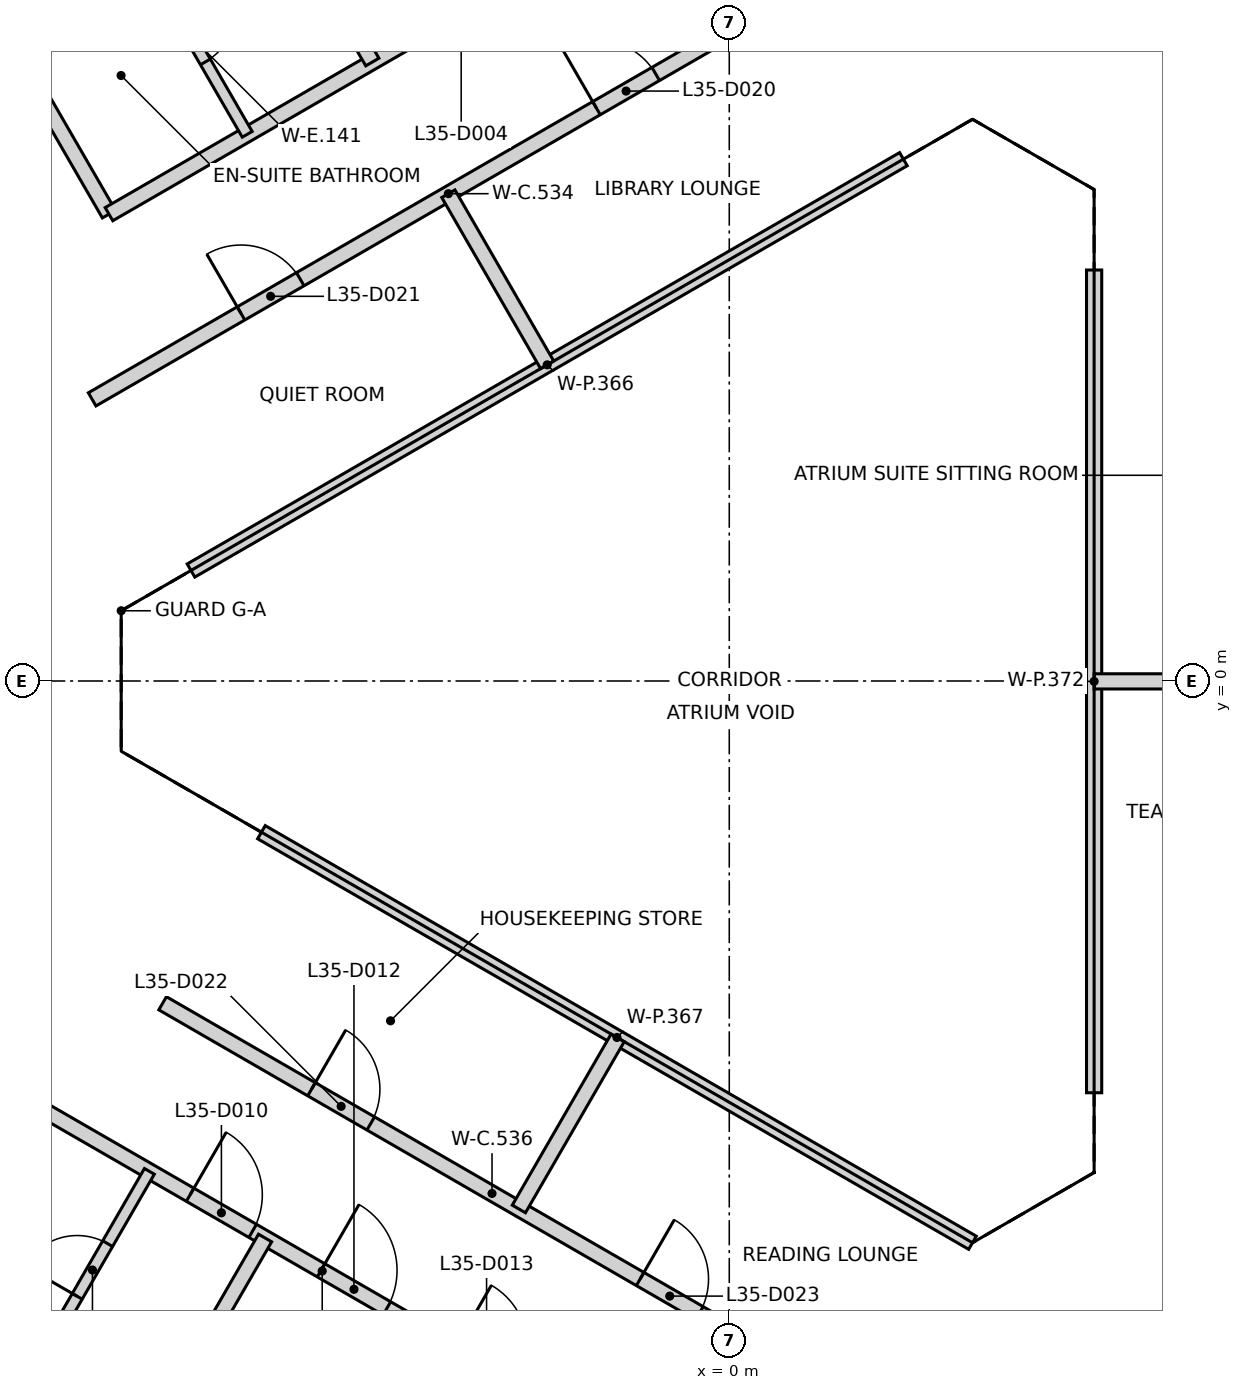
"""IFC4 building model, lengths in metres.
Left out: names, types, materials, properties, quantities, classifications, styles, units other than length and angle.
Written with IfcOpenShell. Run it as: python <this file> out.ifc"""

import sys

from ifc_helpers import new_model, si_unit, direction, frame, frame_2d, origin, place, context, subcontext, project, spatial, rectangle, extrude, element, fill, save


model = new_model("IFC4")
c1 = context("Model", 3, precision=1e-05, world=origin(), true_north=direction((0.0, 1.0)))
c2 = subcontext(c1, "Body", "Model", "MODEL_VIEW")
j1 = project(units=[si_unit("LENGTHUNIT", "METRE"), si_unit("PLANEANGLEUNIT", "RADIAN")], contexts=[c1])
p1 = place(None, origin())
s1 = spatial("IfcSite", under=j1, at=p1, CompositionType="ELEMENT")
p2 = place(p1, origin())
s2 = spatial("IfcBuilding", under=s1, at=p2, CompositionType="ELEMENT")
p3 = place(p2, frame((0.0, 0.0, 143.2)))
s3 = spatial("IfcBuildingStorey", under=s2, at=p3, CompositionType="ELEMENT", Elevation=143.2)
p4 = place(p3, frame((10.42, 6.498, 0.0), z_axis=(0.0, 0.0, 1.0), x_axis=(-0.866021906294, 0.500006057782, 0.0)))
e1 = element("IfcWall", 1, at=p4, inside=s3, PredefinedType="SHEAR", context=c2, shape_type="SweptSolid", body=[
    extrude(rectangle(XDim=11.55, YDim=0.25, at=frame_2d((5.775, 0.0))), origin(), (0.0, 0.0, 1.0), 3.2),
])
p5 = place(p4, frame((10.025, 0.0, 0.0)))
e2 = element("IfcOpeningElement", 2, at=p5, cuts=e1, PredefinedType="OPENING", context=c2, shape_type="SweptSolid", body=[
    extrude(rectangle(XDim=1.2, YDim=2.1, at=frame_2d((0.6, 1.05))), frame((0.0, 0.135, 0.0), z_axis=(0.0, -1.0, 0.0), x_axis=(1.0, 0.0, 0.0)), (0.0, 0.0, 1.0), 0.27),
])
p6 = place(p4, frame((8.725, 0.0, 0.0)))
e3 = element("IfcOpeningElement", 3, at=p6, cuts=e1, PredefinedType="OPENING", context=c2, shape_type="SweptSolid", body=[
    extrude(rectangle(XDim=1.2, YDim=2.1, at=frame_2d((0.6, 1.05))), frame((0.0, 0.135, 0.0), z_axis=(0.0, -1.0, 0.0), x_axis=(1.0, 0.0, 0.0)), (0.0, 0.0, 1.0), 0.27),
])
p7 = place(p3, frame((0.417, -12.273, 0.0), z_axis=(0.0, 0.0, 1.0), x_axis=(0.866021906294, 0.500006057782, 0.0)))
e4 = element("IfcWall", 4, at=p7, inside=s3, PredefinedType="SHEAR", context=c2, shape_type="SweptSolid", body=[
    extrude(rectangle(XDim=11.55, YDim=0.25, at=frame_2d((5.775, 0.0))), origin(), (0.0, 0.0, 1.0), 3.2),
])
p8 = place(p7, frame((10.025, 0.0, 0.0)))
e5 = element("IfcOpeningElement", 5, at=p8, cuts=e4, PredefinedType="OPENING", context=c2, shape_type="SweptSolid", body=[
    extrude(rectangle(XDim=1.2, YDim=2.1, at=frame_2d((0.6, 1.05))), frame((0.0, 0.135, 0.0), z_axis=(0.0, -1.0, 0.0), x_axis=(1.0, 0.0, 0.0)), (0.0, 0.0, 1.0), 0.27),
])
p9 = place(p7, frame((8.725, 0.0, 0.0)))
e6 = element("IfcOpeningElement", 6, at=p9, cuts=e4, PredefinedType="OPENING", context=c2, shape_type="SweptSolid", body=[
    extrude(rectangle(XDim=1.2, YDim=2.1, at=frame_2d((0.6, 1.05))), frame((0.0, 0.135, 0.0), z_axis=(0.0, -1.0, 0.0), x_axis=(1.0, 0.0, 0.0)), (0.0, 0.0, 1.0), 0.27),
])
p10 = place(p3, frame((-9.447, -5.4, 0.0), z_axis=(0.0, 0.0, 1.0), x_axis=(0.866101262146, -0.49986858644, 0.0)))
e7 = element("IfcWall", 7, at=p10, inside=s3, PredefinedType="PARTITIONING", context=c2, shape_type="SweptSolid", body=[
    extrude(rectangle(XDim=9.449, YDim=0.2, at=frame_2d((4.724, 0.0))), origin(), (0.0, 0.0, 1.0), 3.2),
])
p11 = place(p10, frame((2.718, 0.0, 0.0)))
e8 = element("IfcOpeningElement", 8, at=p11, cuts=e7, PredefinedType="OPENING", context=c2, shape_type="SweptSolid", body=[
    extrude(rectangle(XDim=0.95, YDim=2.1, at=frame_2d((0.475, 1.05))), frame((0.0, 0.11, 0.0), z_axis=(0.0, -1.0, 0.0), x_axis=(1.0, 0.0, 0.0)), (0.0, 0.0, 1.0), 0.22),
])
p12 = place(p10, frame((4.707, 0.0, 0.0)))
e9 = element("IfcOpeningElement", 9, at=p12, cuts=e7, PredefinedType="OPENING", context=c2, shape_type="SweptSolid", body=[
    extrude(rectangle(XDim=1.0, YDim=2.1, at=frame_2d((0.5, 1.05))), frame((0.0, 0.11, 0.0), z_axis=(0.0, -1.0, 0.0), x_axis=(1.0, 0.0, 0.0)), (0.0, 0.0, 1.0), 0.22),
])
p13 = place(p10, frame((6.746, 0.0, 0.0)))
e10 = element("IfcOpeningElement", 10, at=p13, cuts=e7, PredefinedType="OPENING", context=c2, shape_type="SweptSolid", body=[
    extrude(rectangle(XDim=0.95, YDim=2.1, at=frame_2d((0.475, 1.05))), frame((0.0, 0.11, 0.0), z_axis=(0.0, -1.0, 0.0), x_axis=(1.0, 0.0, 0.0)), (0.0, 0.0, 1.0), 0.22),
])
p14 = place(p3, frame((-9.033, 7.651, 0.0), z_axis=(0.0, 0.0, 1.0), x_axis=(0.500417633986, -0.865784148386, 0.0)))
e11 = element("IfcWall", 11, at=p14, inside=s3, PredefinedType="PARTITIONING", context=c2, shape_type="SweptSolid", body=[
    extrude(rectangle(XDim=1.743, YDim=0.2, at=frame_2d((0.871, 0.0))), origin(), (0.0, 0.0, 1.0), 3.2),
])
p15 = place(p3, frame((-8.382, 3.705, 0.0), z_axis=(0.0, 0.0, 1.0), x_axis=(0.866012036978, 0.500023151273, 0.0)))
e12 = element("IfcWall", 12, at=p15, inside=s3, PredefinedType="PARTITIONING", context=c2, shape_type="SweptSolid", body=[
    extrude(rectangle(XDim=10.823, YDim=0.2, at=frame_2d((5.412, 0.0))), origin(), (0.0, 0.0, 1.0), 3.2),
])
p16 = place(p15, frame((7.661, 0.0, 0.0)))
e13 = element("IfcOpeningElement", 13, at=p16, cuts=e12, PredefinedType="OPENING", context=c2, shape_type="SweptSolid", body=[
    extrude(rectangle(XDim=0.9, YDim=2.1, at=frame_2d((0.45, 1.05))), frame((0.0, 0.11, 0.0), z_axis=(0.0, -1.0, 0.0), x_axis=(1.0, 0.0, 0.0)), (0.0, 0.0, 1.0), 0.22),
])
p17 = place(p15, frame((2.261, 0.0, 0.0)))
e14 = element("IfcOpeningElement", 14, at=p17, cuts=e12, PredefinedType="OPENING", context=c2, shape_type="SweptSolid", body=[
    extrude(rectangle(XDim=0.9, YDim=2.1, at=frame_2d((0.45, 1.05))), frame((0.0, 0.11, 0.0), z_axis=(0.0, -1.0, 0.0), x_axis=(1.0, 0.0, 0.0)), (0.0, 0.0, 1.0), 0.22),
])
p18 = place(p3, frame((-8.161, 6.142, 0.0), z_axis=(0.0, 0.0, 1.0), x_axis=(0.865927304867, 0.500169873828, 0.0)))
e15 = element("IfcWall", 15, at=p18, inside=s3, PredefinedType="PARTITIONING", context=c2, shape_type="SweptSolid", body=[
    extrude(rectangle(XDim=9.478, YDim=0.2, at=frame_2d((4.739, 0.0))), origin(), (0.0, 0.0, 1.0), 3.2),
])
p19 = place(p18, frame((4.851, 0.0, 0.0)))
e16 = element("IfcOpeningElement", 16, at=p19, cuts=e15, PredefinedType="OPENING", context=c2, shape_type="SweptSolid", body=[
    extrude(rectangle(XDim=1.0, YDim=2.1, at=frame_2d((0.5, 1.05))), frame((0.0, 0.11, 0.0), z_axis=(0.0, -1.0, 0.0), x_axis=(1.0, 0.0, 0.0)), (0.0, 0.0, 1.0), 0.22),
])
p20 = place(p18, frame((7.583, 0.0, 0.0)))
e17 = element("IfcOpeningElement", 17, at=p20, cuts=e15, PredefinedType="OPENING", context=c2, shape_type="SweptSolid", body=[
    extrude(rectangle(XDim=1.0, YDim=2.1, at=frame_2d((0.5, 1.05))), frame((0.0, 0.11, 0.0), z_axis=(0.0, -1.0, 0.0), x_axis=(1.0, 0.0, 0.0)), (0.0, 0.0, 1.0), 0.22),
])
p21 = place(p3, frame((-7.455, -4.24, 0.0), z_axis=(0.0, 0.0, 1.0), x_axis=(0.866015783746, -0.500016662025, 0.0)))
e18 = element("IfcWall", 18, at=p21, inside=s3, PredefinedType="PARTITIONING", context=c2, shape_type="SweptSolid", body=[
    extrude(rectangle(XDim=10.009, YDim=0.2, at=frame_2d((5.004, 0.0))), origin(), (0.0, 0.0, 1.0), 3.2),
])
p22 = place(p21, frame((2.262, 0.0, 0.0)))
e19 = element("IfcOpeningElement", 19, at=p22, cuts=e18, PredefinedType="OPENING", context=c2, shape_type="SweptSolid", body=[
    extrude(rectangle(XDim=0.9, YDim=2.1, at=frame_2d((0.45, 1.05))), frame((0.0, 0.11, 0.0), z_axis=(0.0, -1.0, 0.0), x_axis=(1.0, 0.0, 0.0)), (0.0, 0.0, 1.0), 0.22),
])
p23 = place(p21, frame((7.254, 0.0, 0.0)))
e20 = element("IfcOpeningElement", 20, at=p23, cuts=e18, PredefinedType="OPENING", context=c2, shape_type="SweptSolid", body=[
    extrude(rectangle(XDim=0.9, YDim=2.1, at=frame_2d((0.45, 1.05))), frame((0.0, 0.11, 0.0), z_axis=(0.0, -1.0, 0.0), x_axis=(1.0, 0.0, 0.0)), (0.0, 0.0, 1.0), 0.22),
])
p24 = place(p3, frame((-12.22, -17.917, 0.0), z_axis=(0.0, 0.0, 1.0), x_axis=(0.499963860175, 0.866046268117, 0.0)))
e21 = element("IfcWall", 21, at=p24, inside=s3, PredefinedType="PARTITIONING", context=c2, shape_type="SweptSolid", body=[
    extrude(rectangle(XDim=12.227, YDim=0.2, at=frame_2d((6.114, 0.0))), origin(), (0.0, 0.0, 1.0), 2.3),
])
p25 = place(p3, frame((-10.809, 18.731, 0.0), z_axis=(0.0, 0.0, 1.0), x_axis=(0.500004774777, -0.866022647048, 0.0)))
e22 = element("IfcWall", 22, at=p25, inside=s3, PredefinedType="PARTITIONING", context=c2, shape_type="SweptSolid", body=[
    extrude(rectangle(XDim=12.227, YDim=0.2, at=frame_2d((6.113, 0.0))), origin(), (0.0, 0.0, 1.0), 2.3),
])
p26 = place(p3, frame((-7.082, 1.453, 0.0), z_axis=(0.0, 0.0, 1.0), x_axis=(0.866010525116, 0.500025769724, 0.0)))
e23 = element("IfcWall", 23, at=p26, inside=s3, PredefinedType="PARTITIONING", context=c2, shape_type="SweptSolid", body=[
    extrude(rectangle(XDim=10.823, YDim=0.2, at=frame_2d((5.411, 0.0))), origin(), (0.0, 0.0, 1.0), 2.3),
])
p27 = place(p3, frame((-6.155, -1.989, 0.0), z_axis=(0.0, 0.0, 1.0), x_axis=(0.866009062299, -0.500028303215, 0.0)))
e24 = element("IfcWall", 24, at=p27, inside=s3, PredefinedType="PARTITIONING", context=c2, shape_type="SweptSolid", body=[
    extrude(rectangle(XDim=10.802, YDim=0.2, at=frame_2d((5.401, 0.0))), origin(), (0.0, 0.0, 1.0), 2.3),
])
p28 = place(p3, frame((-3.696, 6.411, 0.0), z_axis=(0.0, 0.0, 1.0), x_axis=(0.500006934395, -0.866021400173, 0.0)))
e25 = element("IfcWall", 25, at=p28, inside=s3, PredefinedType="PARTITIONING", context=c2, shape_type="SweptSolid", body=[
    extrude(rectangle(XDim=2.6, YDim=0.2, at=frame_2d((1.3, 0.0))), origin(), (0.0, 0.0, 1.0), 2.3),
])
p29 = place(p3, frame((-2.768, -6.946, 0.0), z_axis=(0.0, 0.0, 1.0), x_axis=(0.500017832597, 0.866015107885, 0.0)))
e26 = element("IfcWall", 26, at=p29, inside=s3, PredefinedType="PARTITIONING", context=c2, shape_type="SweptSolid", body=[
    extrude(rectangle(XDim=2.6, YDim=0.2, at=frame_2d((1.3, 0.0))), origin(), (0.0, 0.0, 1.0), 2.3),
])
p30 = place(p3, frame((4.8, -5.417, 0.0), z_axis=(0.0, 0.0, 1.0), x_axis=(0.0, 1.0, 0.0)))
e27 = element("IfcWall", 27, at=p30, inside=s3, PredefinedType="PARTITIONING", context=c2, shape_type="SweptSolid", body=[
    extrude(rectangle(XDim=10.824, YDim=0.2, at=frame_2d((5.412, 0.0))), origin(), (0.0, 0.0, 1.0), 2.3),
])
p31 = place(p3, frame((4.8, -0.005, 0.0), z_axis=(0.0, 0.0, 1.0), x_axis=(1.0, 0.0, 0.0)))
e28 = element("IfcWall", 28, at=p31, inside=s3, PredefinedType="PARTITIONING", context=c2, shape_type="SweptSolid", body=[
    extrude(rectangle(XDim=2.505, YDim=0.2, at=frame_2d((1.252, 0.0))), origin(), (0.0, 0.0, 1.0), 2.3),
])
p32 = place(p3, frame((-9.127, -9.046, 0.0), z_axis=(0.0, 0.0, 1.0), x_axis=(0.499959910729, 0.866048548099, 0.0)))
e29 = element("IfcWall", 29, at=p32, inside=s3, PredefinedType="PARTITIONING", context=c2, shape_type="SweptSolid", body=[
    extrude(rectangle(XDim=2.996, YDim=0.15, at=frame_2d((1.498, 0.0))), origin(), (0.0, 0.0, 1.0), 3.2),
])
p33 = place(p32, frame((1.098, 0.0, 0.0)))
e30 = element("IfcOpeningElement", 30, at=p33, cuts=e29, PredefinedType="OPENING", context=c2, shape_type="SweptSolid", body=[
    extrude(rectangle(XDim=0.8, YDim=2.1, at=frame_2d((0.4, 1.05))), frame((0.0, 0.085, 0.0), z_axis=(0.0, -1.0, 0.0), x_axis=(1.0, 0.0, 0.0)), (0.0, 0.0, 1.0), 0.17),
])
p34 = place(p3, frame((-7.843, 9.79, 0.0), z_axis=(0.0, 0.0, 1.0), x_axis=(0.500234218456, -0.865890135459, 0.0)))
e31 = element("IfcWall", 31, at=p34, inside=s3, PredefinedType="PARTITIONING", context=c2, shape_type="SweptSolid", body=[
    extrude(rectangle(XDim=3.0, YDim=0.15, at=frame_2d((1.5, 0.0))), origin(), (0.0, 0.0, 1.0), 3.2),
])
p35 = place(p34, frame((1.1, 0.0, 0.0)))
e32 = element("IfcOpeningElement", 32, at=p35, cuts=e31, PredefinedType="OPENING", context=c2, shape_type="SweptSolid", body=[
    extrude(rectangle(XDim=0.8, YDim=2.1, at=frame_2d((0.4, 1.05))), frame((0.0, 0.085, 0.0), z_axis=(0.0, -1.0, 0.0), x_axis=(1.0, 0.0, 0.0)), (0.0, 0.0, 1.0), 0.17),
])
p36 = place(p35, frame((0.8, 0.0, 0.0), z_axis=(0.0, 0.0, 1.0), x_axis=(-1.0, 0.0, 0.0)))
e33 = element("IfcDoor", 33, at=p36, inside=s3, OperationType="SINGLE_SWING_LEFT", PredefinedType="DOOR", context=c2, shape_type="SweptSolid", body=[
    extrude(rectangle(XDim=0.8, YDim=2.1, at=frame_2d((0.4, 1.05))), frame((0.0, 0.025, 0.0), z_axis=(0.0, -1.0, 0.0), x_axis=(1.0, 0.0, 0.0)), (0.0, 0.0, 1.0), 0.05),
])
fill(e32, e33)
p37 = place(p11, frame((0.95, 0.0, 0.0), z_axis=(0.0, 0.0, 1.0), x_axis=(-1.0, 0.0, 0.0)))
e34 = element("IfcDoor", 34, at=p37, inside=s3, OperationType="SINGLE_SWING_LEFT", PredefinedType="DOOR", context=c2, shape_type="SweptSolid", body=[
    extrude(rectangle(XDim=0.95, YDim=2.1, at=frame_2d((0.475, 1.05))), frame((0.0, 0.025, 0.0), z_axis=(0.0, -1.0, 0.0), x_axis=(1.0, 0.0, 0.0)), (0.0, 0.0, 1.0), 0.05),
])
fill(e8, e34)
p38 = place(p33, origin())
e35 = element("IfcDoor", 35, at=p38, inside=s3, OperationType="SINGLE_SWING_LEFT", PredefinedType="DOOR", context=c2, shape_type="SweptSolid", body=[
    extrude(rectangle(XDim=0.8, YDim=2.1, at=frame_2d((0.4, 1.05))), frame((0.0, 0.025, 0.0), z_axis=(0.0, -1.0, 0.0), x_axis=(1.0, 0.0, 0.0)), (0.0, 0.0, 1.0), 0.05),
])
fill(e30, e35)
p39 = place(p12, frame((1.0, 0.0, 0.0), z_axis=(0.0, 0.0, 1.0), x_axis=(-1.0, 0.0, 0.0)))
e36 = element("IfcDoor", 36, at=p39, inside=s3, OperationType="SINGLE_SWING_LEFT", PredefinedType="DOOR", context=c2, shape_type="SweptSolid", body=[
    extrude(rectangle(XDim=1.0, YDim=2.1, at=frame_2d((0.5, 1.05))), frame((0.0, 0.025, 0.0), z_axis=(0.0, -1.0, 0.0), x_axis=(1.0, 0.0, 0.0)), (0.0, 0.0, 1.0), 0.05),
])
fill(e9, e36)
p40 = place(p16, frame((0.9, 0.0, 0.0), z_axis=(0.0, 0.0, 1.0), x_axis=(-1.0, 0.0, 0.0)))
e37 = element("IfcDoor", 37, at=p40, inside=s3, OperationType="SINGLE_SWING_LEFT", PredefinedType="DOOR", context=c2, shape_type="SweptSolid", body=[
    extrude(rectangle(XDim=0.9, YDim=2.1, at=frame_2d((0.45, 1.05))), frame((0.0, 0.025, 0.0), z_axis=(0.0, -1.0, 0.0), x_axis=(1.0, 0.0, 0.0)), (0.0, 0.0, 1.0), 0.05),
])
fill(e13, e37)
p41 = place(p17, frame((0.9, 0.0, 0.0), z_axis=(0.0, 0.0, 1.0), x_axis=(-1.0, 0.0, 0.0)))
e38 = element("IfcDoor", 38, at=p41, inside=s3, OperationType="SINGLE_SWING_LEFT", PredefinedType="DOOR", context=c2, shape_type="SweptSolid", body=[
    extrude(rectangle(XDim=0.9, YDim=2.1, at=frame_2d((0.45, 1.05))), frame((0.0, 0.025, 0.0), z_axis=(0.0, -1.0, 0.0), x_axis=(1.0, 0.0, 0.0)), (0.0, 0.0, 1.0), 0.05),
])
fill(e14, e38)
p42 = place(p22, origin())
e39 = element("IfcDoor", 39, at=p42, inside=s3, OperationType="SINGLE_SWING_LEFT", PredefinedType="DOOR", context=c2, shape_type="SweptSolid", body=[
    extrude(rectangle(XDim=0.9, YDim=2.1, at=frame_2d((0.45, 1.05))), frame((0.0, 0.025, 0.0), z_axis=(0.0, -1.0, 0.0), x_axis=(1.0, 0.0, 0.0)), (0.0, 0.0, 1.0), 0.05),
])
fill(e19, e39)
p43 = place(p23, origin())
e40 = element("IfcDoor", 40, at=p43, inside=s3, OperationType="SINGLE_SWING_LEFT", PredefinedType="DOOR", context=c2, shape_type="SweptSolid", body=[
    extrude(rectangle(XDim=0.9, YDim=2.1, at=frame_2d((0.45, 1.05))), frame((0.0, 0.025, 0.0), z_axis=(0.0, -1.0, 0.0), x_axis=(1.0, 0.0, 0.0)), (0.0, 0.0, 1.0), 0.05),
])
fill(e20, e40)
save(model, sys.argv[1])
